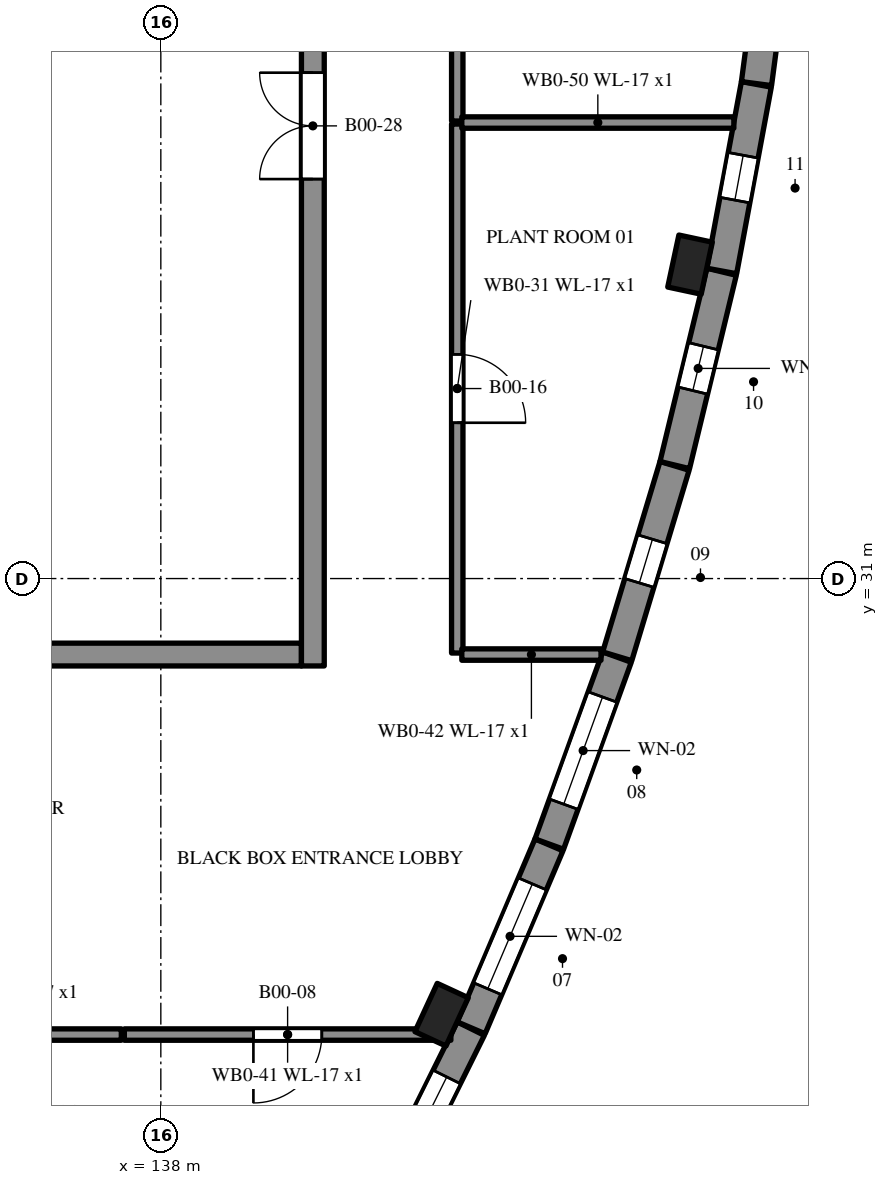
"""IFC4 building model, lengths in metres.
Left out: names, types, materials, properties, quantities, classifications, styles, units other than length and angle.
Written with IfcOpenShell. Run it as: python <this file> out.ifc"""

import sys

from ifc_helpers import new_model, si_unit, direction, frame, frame_2d, origin, origin_2d, place, context, subcontext, project, spatial, rectangle, extrude, element, fill, save


model = new_model("IFC4")
c1 = context("Model", 3, precision=1e-05, world=origin(), true_north=direction((0.0, 1.0)))
c2 = subcontext(c1, "Body", "Model", "MODEL_VIEW")
j1 = project(units=[si_unit("LENGTHUNIT", "METRE"), si_unit("PLANEANGLEUNIT", "RADIAN")], contexts=[c1])
p1 = place(None, origin())
s1 = spatial("IfcSite", under=j1, at=p1, CompositionType="ELEMENT")
p2 = place(p1, origin())
s2 = spatial("IfcBuilding", under=s1, at=p2, CompositionType="ELEMENT")
p3 = place(p2, origin())
s3 = spatial("IfcBuildingStorey", under=s2, at=p3, CompositionType="ELEMENT", Elevation=0.0)
p4 = place(p3, frame((140.78, 22.463, 0.0), z_axis=(0.0, 0.0, 1.0), x_axis=(0.44433489597, 0.895860759395, 0.0)))
e1 = element("IfcWall", 1, at=p4, inside=s3, PredefinedType="SOLIDWALL", context=c2, shape_type="SweptSolid", body=[
    extrude(rectangle(XDim=2.92, YDim=0.4, at=frame_2d((1.46, 0.0))), origin(), (0.0, 0.0, 1.0), 5.1),
])
p5 = place(p4, frame((0.71, 0.0, 2.4)))
e2 = element("IfcOpeningElement", 2, at=p5, cuts=e1, PredefinedType="OPENING", context=c2, shape_type="SweptSolid", body=[
    extrude(rectangle(XDim=1.5, YDim=0.9, at=frame_2d((0.75, 0.45))), frame((0.0, 0.21, 0.0), z_axis=(0.0, -1.0, 0.0), x_axis=(1.0, 0.0, 0.0)), (0.0, 0.0, 1.0), 0.42),
])
p6 = place(p3, frame((142.083, 25.089, 0.0), z_axis=(0.0, 0.0, 1.0), x_axis=(0.391529943778, 0.920165367271, 0.0)))
e3 = element("IfcWall", 3, at=p6, inside=s3, PredefinedType="SOLIDWALL", context=c2, shape_type="SweptSolid", body=[
    extrude(rectangle(XDim=2.616, YDim=0.4, at=frame_2d((1.308, 0.0))), origin(), (0.0, 0.0, 1.0), 5.1),
])
p7 = place(p6, frame((0.558, 0.0, 0.3)))
e4 = element("IfcOpeningElement", 4, at=p7, cuts=e3, PredefinedType="OPENING", context=c2, shape_type="SweptSolid", body=[
    extrude(rectangle(XDim=1.5, YDim=2.7, at=frame_2d((0.75, 1.35))), frame((0.0, 0.21, 0.0), z_axis=(0.0, -1.0, 0.0), x_axis=(1.0, 0.0, 0.0)), (0.0, 0.0, 1.0), 0.42),
])
p8 = place(p3, frame((143.111, 27.506, 0.0), z_axis=(0.0, 0.0, 1.0), x_axis=(0.340394146267, 0.940282843184, 0.0)))
e5 = element("IfcWall", 5, at=p8, inside=s3, PredefinedType="SOLIDWALL", context=c2, shape_type="SweptSolid", body=[
    extrude(rectangle(XDim=2.616, YDim=0.4, at=frame_2d((1.308, 0.0))), origin(), (0.0, 0.0, 1.0), 5.1),
])
p9 = place(p8, frame((0.558, 0.0, 0.3)))
e6 = element("IfcOpeningElement", 6, at=p9, cuts=e5, PredefinedType="OPENING", context=c2, shape_type="SweptSolid", body=[
    extrude(rectangle(XDim=1.5, YDim=2.7, at=frame_2d((0.75, 1.35))), frame((0.0, 0.21, 0.0), z_axis=(0.0, -1.0, 0.0), x_axis=(1.0, 0.0, 0.0)), (0.0, 0.0, 1.0), 0.42),
])
p10 = place(p3, frame((144.005, 29.977, 0.0), z_axis=(0.0, 0.0, 1.0), x_axis=(0.288212317298, 0.957566530408, 0.0)))
e7 = element("IfcWall", 7, at=p10, inside=s3, PredefinedType="SOLIDWALL", context=c2, shape_type="SweptSolid", body=[
    extrude(rectangle(XDim=2.617, YDim=0.4, at=frame_2d((1.308, 0.0))), origin(), (0.0, 0.0, 1.0), 5.1),
])
p11 = place(p10, frame((1.008, 0.0, 2.4)))
e8 = element("IfcOpeningElement", 8, at=p11, cuts=e7, PredefinedType="OPENING", context=c2, shape_type="SweptSolid", body=[
    extrude(rectangle(XDim=0.6, YDim=0.6, at=frame_2d((0.3, 0.3))), frame((0.0, 0.21, 0.0), z_axis=(0.0, -1.0, 0.0), x_axis=(1.0, 0.0, 0.0)), (0.0, 0.0, 1.0), 0.42),
])
p12 = place(p3, frame((144.762, 32.493, 0.0), z_axis=(0.0, 0.0, 1.0), x_axis=(0.235108668597, 0.971969091047, 0.0)))
e9 = element("IfcWall", 9, at=p12, inside=s3, PredefinedType="SOLIDWALL", context=c2, shape_type="SweptSolid", body=[
    extrude(rectangle(XDim=2.617, YDim=0.4, at=frame_2d((1.308, 0.0))), origin(), (0.0, 0.0, 1.0), 5.1),
])
p13 = place(p12, frame((1.008, 0.0, 2.4)))
e10 = element("IfcOpeningElement", 10, at=p13, cuts=e9, PredefinedType="OPENING", context=c2, shape_type="SweptSolid", body=[
    extrude(rectangle(XDim=0.6, YDim=0.6, at=frame_2d((0.3, 0.3))), frame((0.0, 0.21, 0.0), z_axis=(0.0, -1.0, 0.0), x_axis=(1.0, 0.0, 0.0)), (0.0, 0.0, 1.0), 0.42),
])
p14 = place(p3, frame((145.379, 35.047, 0.0), z_axis=(0.0, 0.0, 1.0), x_axis=(0.182652956339, 0.983177449671, 0.0)))
e11 = element("IfcWall", 11, at=p14, inside=s3, PredefinedType="SOLIDWALL", context=c2, shape_type="SweptSolid", body=[
    extrude(rectangle(XDim=2.497, YDim=0.4, at=frame_2d((1.249, 0.0))), origin(), (0.0, 0.0, 1.0), 5.1),
])
p15 = place(p14, frame((0.948, 0.0, 2.4)))
e12 = element("IfcOpeningElement", 12, at=p15, cuts=e11, PredefinedType="OPENING", context=c2, shape_type="SweptSolid", body=[
    extrude(rectangle(XDim=0.6, YDim=0.6, at=frame_2d((0.3, 0.3))), frame((0.0, 0.21, 0.0), z_axis=(0.0, -1.0, 0.0), x_axis=(1.0, 0.0, 0.0)), (0.0, 0.0, 1.0), 0.42),
])
p16 = place(p3, frame((145.837, 37.512, 0.0), z_axis=(0.0, 0.0, 1.0), x_axis=(0.130722601708, 0.991418983782, 0.0)))
e13 = element("IfcWall", 13, at=p16, inside=s3, PredefinedType="SOLIDWALL", context=c2, shape_type="SweptSolid", body=[
    extrude(rectangle(XDim=2.497, YDim=0.4, at=frame_2d((1.249, 0.0))), origin(), (0.0, 0.0, 1.0), 5.1),
])
p17 = place(p16, frame((0.799, 0.0, 2.0)))
e14 = element("IfcOpeningElement", 14, at=p17, cuts=e13, PredefinedType="OPENING", context=c2, shape_type="SweptSolid", body=[
    extrude(rectangle(XDim=0.9, YDim=0.6, at=frame_2d((0.45, 0.3))), frame((0.0, 0.21, 0.0), z_axis=(0.0, -1.0, 0.0), x_axis=(1.0, 0.0, 0.0)), (0.0, 0.0, 1.0), 0.42),
])
for number, where, z_axis, x_axis in (
    (15, (141.694, 25.261, 0.0), (0.0, 0.0, 1.0), (0.42, 0.908, 0.0)),
    (16, (144.963, 35.131, 0.0), (0.0, 0.0, 1.0), (0.21, 0.978, 0.0)),
):
    element("IfcColumn", number, at=place(p3, frame(where, z_axis=z_axis, x_axis=x_axis)), inside=s3, PredefinedType="PILASTER", context=c2, shape_type="SweptSolid", body=[
        extrude(rectangle(XDim=0.7, YDim=0.45, at=origin_2d()), origin(), (0.0, 0.0, 1.0), 5.1),
    ])
p18 = place(p3, frame((139.85, 30.0, 0.0), z_axis=(0.0, 0.0, 1.0), x_axis=(-1.0, 0.0, 0.0)))
e17 = element("IfcWall", 17, at=p18, inside=s3, PredefinedType="SHEAR", context=c2, shape_type="SweptSolid", body=[
    extrude(rectangle(XDim=15.7, YDim=0.3, at=frame_2d((7.85, 0.0))), origin(), (0.0, 0.0, 1.0), 5.1),
])
p19 = place(p18, frame((6.95, 0.0, 0.0)))
e18 = element("IfcOpeningElement", 18, at=p19, cuts=e17, PredefinedType="OPENING", context=c2, shape_type="SweptSolid", body=[
    extrude(rectangle(XDim=1.8, YDim=2.1, at=frame_2d((0.9, 1.05))), frame((0.0, 0.16, 0.0), z_axis=(0.0, -1.0, 0.0), x_axis=(1.0, 0.0, 0.0)), (0.0, 0.0, 1.0), 0.32),
])
p20 = place(p3, frame((140.0, 29.85, 0.0), z_axis=(0.0, 0.0, 1.0), x_axis=(0.0, 1.0, 0.0)))
e19 = element("IfcWall", 19, at=p20, inside=s3, PredefinedType="SHEAR", context=c2, shape_type="SweptSolid", body=[
    extrude(rectangle(XDim=32.3, YDim=0.3, at=frame_2d((16.15, 0.0))), origin(), (0.0, 0.0, 1.0), 5.1),
])
p21 = place(p20, frame((6.406, 0.0, 0.0)))
e20 = element("IfcOpeningElement", 20, at=p21, cuts=e19, PredefinedType="OPENING", context=c2, shape_type="SweptSolid", body=[
    extrude(rectangle(XDim=1.4, YDim=2.1, at=frame_2d((0.7, 1.05))), frame((0.0, 0.16, 0.0), z_axis=(0.0, -1.0, 0.0), x_axis=(1.0, 0.0, 0.0)), (0.0, 0.0, 1.0), 0.32),
])
p22 = place(p20, frame((24.494, 0.0, 0.0)))
e21 = element("IfcOpeningElement", 21, at=p22, cuts=e19, PredefinedType="OPENING", context=c2, shape_type="SweptSolid", body=[
    extrude(rectangle(XDim=1.4, YDim=2.1, at=frame_2d((0.7, 1.05))), frame((0.0, 0.16, 0.0), z_axis=(0.0, -1.0, 0.0), x_axis=(1.0, 0.0, 0.0)), (0.0, 0.0, 1.0), 0.32),
])
p23 = place(p3, frame((141.9, 36.98, 0.0), z_axis=(0.0, 0.0, 1.0), x_axis=(0.0, -1.0, 0.0)))
e22 = element("IfcWall", 22, at=p23, inside=s3, PredefinedType="PARTITIONING", context=c2, shape_type="SweptSolid", body=[
    extrude(rectangle(XDim=6.96, YDim=0.15, at=frame_2d((3.48, 0.0))), origin(), (0.0, 0.0, 1.0), 5.1),
])
p24 = place(p23, frame((3.03, 0.0, 0.0)))
e23 = element("IfcOpeningElement", 23, at=p24, cuts=e22, PredefinedType="OPENING", context=c2, shape_type="SweptSolid", body=[
    extrude(rectangle(XDim=0.9, YDim=2.1, at=frame_2d((0.45, 1.05))), frame((0.0, 0.085, 0.0), z_axis=(0.0, -1.0, 0.0), x_axis=(1.0, 0.0, 0.0)), (0.0, 0.0, 1.0), 0.17),
])
p25 = place(p3, frame((141.9, 42.48, 0.0), z_axis=(0.0, 0.0, 1.0), x_axis=(0.0, -1.0, 0.0)))
e24 = element("IfcWall", 24, at=p25, inside=s3, PredefinedType="PARTITIONING", context=c2, shape_type="SweptSolid", body=[
    extrude(rectangle(XDim=5.46, YDim=0.15, at=frame_2d((2.73, 0.0))), origin(), (0.0, 0.0, 1.0), 5.1),
])
p26 = place(p25, frame((2.28, 0.0, 0.0)))
e25 = element("IfcOpeningElement", 25, at=p26, cuts=e24, PredefinedType="OPENING", context=c2, shape_type="SweptSolid", body=[
    extrude(rectangle(XDim=0.9, YDim=2.1, at=frame_2d((0.45, 1.05))), frame((0.0, 0.085, 0.0), z_axis=(0.0, -1.0, 0.0), x_axis=(1.0, 0.0, 0.0)), (0.0, 0.0, 1.0), 0.17),
])
p27 = place(p3, frame((137.48, 25.0, 0.0), z_axis=(0.0, 0.0, 1.0), x_axis=(-1.0, 0.0, 0.0)))
e26 = element("IfcWall", 26, at=p27, inside=s3, PredefinedType="PARTITIONING", context=c2, shape_type="SweptSolid", body=[
    extrude(rectangle(XDim=3.13, YDim=0.15, at=frame_2d((1.565, 0.0))), origin(), (0.0, 0.0, 1.0), 5.1),
])
p28 = place(p3, frame((141.816, 25.0, 0.0), z_axis=(0.0, 0.0, 1.0), x_axis=(-1.0, 0.0, 0.0)))
e27 = element("IfcWall", 27, at=p28, inside=s3, PredefinedType="PARTITIONING", context=c2, shape_type="SweptSolid", body=[
    extrude(rectangle(XDim=4.296, YDim=0.15, at=frame_2d((2.148, 0.0))), origin(), (0.0, 0.0, 1.0), 5.1),
])
p29 = place(p28, frame((1.698, 0.0, 0.0)))
e28 = element("IfcOpeningElement", 28, at=p29, cuts=e27, PredefinedType="OPENING", context=c2, shape_type="SweptSolid", body=[
    extrude(rectangle(XDim=0.9, YDim=2.1, at=frame_2d((0.45, 1.05))), frame((0.0, 0.085, 0.0), z_axis=(0.0, -1.0, 0.0), x_axis=(1.0, 0.0, 0.0)), (0.0, 0.0, 1.0), 0.17),
])
p30 = place(p3, frame((141.96, 30.0, 0.0), z_axis=(0.0, 0.0, 1.0), x_axis=(1.0, 0.0, 0.0)))
e29 = element("IfcWall", 29, at=p30, inside=s3, PredefinedType="PARTITIONING", context=c2, shape_type="SweptSolid", body=[
    extrude(rectangle(XDim=1.831, YDim=0.15, at=frame_2d((0.916, 0.0))), origin(), (0.0, 0.0, 1.0), 5.1),
])
p31 = place(p3, frame((141.96, 37.0, 0.0), z_axis=(0.0, 0.0, 1.0), x_axis=(1.0, 0.0, 0.0)))
e30 = element("IfcWall", 30, at=p31, inside=s3, PredefinedType="PARTITIONING", context=c2, shape_type="SweptSolid", body=[
    extrude(rectangle(XDim=3.579, YDim=0.15, at=frame_2d((1.79, 0.0))), origin(), (0.0, 0.0, 1.0), 5.1),
])
p32 = place(p5, origin())
e31 = element("IfcWindow", 31, at=p32, inside=s3, PartitioningType="SINGLE_PANEL", PredefinedType="WINDOW", context=c2, shape_type="SweptSolid", body=[
    extrude(rectangle(XDim=1.5, YDim=0.9, at=frame_2d((0.75, 0.45))), frame((0.0, 0.03, 0.0), z_axis=(0.0, -1.0, 0.0), x_axis=(1.0, 0.0, 0.0)), (0.0, 0.0, 1.0), 0.06),
])
fill(e2, e31)
p33 = place(p7, origin())
e32 = element("IfcWindow", 32, at=p33, inside=s3, PartitioningType="SINGLE_PANEL", PredefinedType="WINDOW", context=c2, shape_type="SweptSolid", body=[
    extrude(rectangle(XDim=1.5, YDim=2.7, at=frame_2d((0.75, 1.35))), frame((0.0, 0.03, 0.0), z_axis=(0.0, -1.0, 0.0), x_axis=(1.0, 0.0, 0.0)), (0.0, 0.0, 1.0), 0.06),
])
fill(e4, e32)
p34 = place(p9, origin())
e33 = element("IfcWindow", 33, at=p34, inside=s3, PartitioningType="SINGLE_PANEL", PredefinedType="WINDOW", context=c2, shape_type="SweptSolid", body=[
    extrude(rectangle(XDim=1.5, YDim=2.7, at=frame_2d((0.75, 1.35))), frame((0.0, 0.03, 0.0), z_axis=(0.0, -1.0, 0.0), x_axis=(1.0, 0.0, 0.0)), (0.0, 0.0, 1.0), 0.06),
])
fill(e6, e33)
p35 = place(p11, origin())
e34 = element("IfcWindow", 34, at=p35, inside=s3, PartitioningType="SINGLE_PANEL", PredefinedType="WINDOW", context=c2, shape_type="SweptSolid", body=[
    extrude(rectangle(XDim=0.6, YDim=0.6, at=frame_2d((0.3, 0.3))), frame((0.0, 0.03, 0.0), z_axis=(0.0, -1.0, 0.0), x_axis=(1.0, 0.0, 0.0)), (0.0, 0.0, 1.0), 0.06),
])
fill(e8, e34)
p36 = place(p13, origin())
e35 = element("IfcWindow", 35, at=p36, inside=s3, PartitioningType="SINGLE_PANEL", PredefinedType="WINDOW", context=c2, shape_type="SweptSolid", body=[
    extrude(rectangle(XDim=0.6, YDim=0.6, at=frame_2d((0.3, 0.3))), frame((0.0, 0.03, 0.0), z_axis=(0.0, -1.0, 0.0), x_axis=(1.0, 0.0, 0.0)), (0.0, 0.0, 1.0), 0.06),
])
fill(e10, e35)
p37 = place(p15, origin())
e36 = element("IfcWindow", 36, at=p37, inside=s3, PartitioningType="SINGLE_PANEL", PredefinedType="WINDOW", context=c2, shape_type="SweptSolid", body=[
    extrude(rectangle(XDim=0.6, YDim=0.6, at=frame_2d((0.3, 0.3))), frame((0.0, 0.03, 0.0), z_axis=(0.0, -1.0, 0.0), x_axis=(1.0, 0.0, 0.0)), (0.0, 0.0, 1.0), 0.06),
])
fill(e12, e36)
p38 = place(p29, origin())
e37 = element("IfcDoor", 37, at=p38, inside=s3, OperationType="SINGLE_SWING_RIGHT", PredefinedType="DOOR", context=c2, shape_type="SweptSolid", body=[
    extrude(rectangle(XDim=0.9, YDim=2.1, at=frame_2d((0.45, 1.05))), frame((0.0, 0.025, 0.0), z_axis=(0.0, -1.0, 0.0), x_axis=(1.0, 0.0, 0.0)), (0.0, 0.0, 1.0), 0.05),
])
fill(e28, e37)
p39 = place(p24, origin())
e38 = element("IfcDoor", 38, at=p39, inside=s3, OperationType="SINGLE_SWING_RIGHT", PredefinedType="DOOR", context=c2, shape_type="SweptSolid", body=[
    extrude(rectangle(XDim=0.9, YDim=2.1, at=frame_2d((0.45, 1.05))), frame((0.0, 0.025, 0.0), z_axis=(0.0, -1.0, 0.0), x_axis=(1.0, 0.0, 0.0)), (0.0, 0.0, 1.0), 0.05),
])
fill(e23, e38)
p40 = place(p21, origin())
e39 = element("IfcDoor", 39, at=p40, inside=s3, OperationType="DOUBLE_DOOR_SINGLE_SWING", PredefinedType="DOOR", context=c2, shape_type="SweptSolid", body=[
    extrude(rectangle(XDim=1.4, YDim=2.1, at=frame_2d((0.7, 1.05))), frame((0.0, 0.025, 0.0), z_axis=(0.0, -1.0, 0.0), x_axis=(1.0, 0.0, 0.0)), (0.0, 0.0, 1.0), 0.05),
])
fill(e20, e39)
save(model, sys.argv[1])
